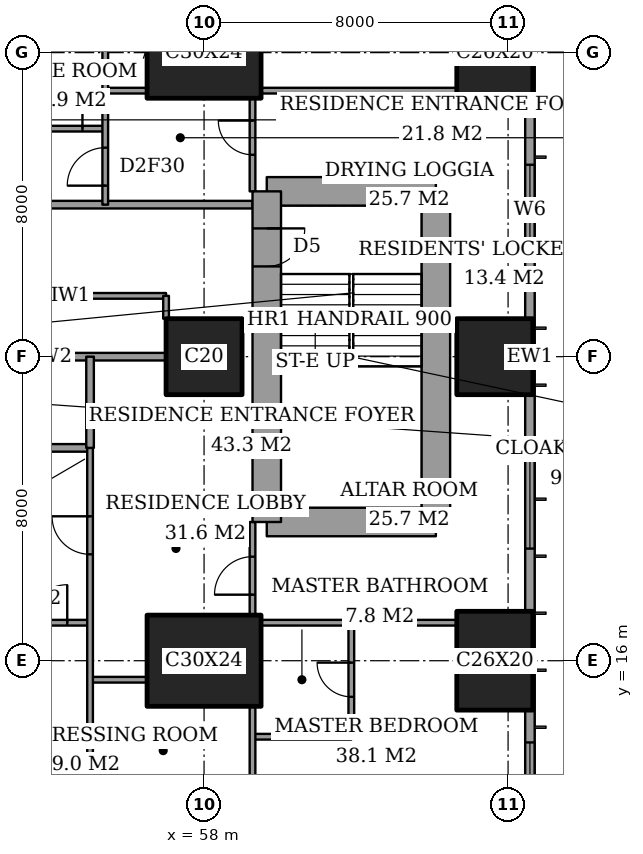
"""IFC4 building model, lengths in metres.
Left out: names, types, materials, properties, quantities, classifications, styles, units other than length and angle.
Written with IfcOpenShell. Run it as: python <this file> out.ifc"""

import sys

from ifc_helpers import new_model, si_unit, direction, frame, frame_2d, origin, origin_2d, place, context, subcontext, project, spatial, rectangle, extrude, element, fill, save


model = new_model("IFC4")
c1 = context("Model", 3, precision=1e-05, world=origin(), true_north=direction((0.0, 1.0)))
c2 = subcontext(c1, "Body", "Model", "MODEL_VIEW")
j1 = project(units=[si_unit("LENGTHUNIT", "METRE"), si_unit("PLANEANGLEUNIT", "RADIAN")], contexts=[c1])
p1 = place(None, origin())
s1 = spatial("IfcSite", under=j1, at=p1, CompositionType="ELEMENT")
p2 = place(p1, origin())
s2 = spatial("IfcBuilding", under=s1, at=p2, CompositionType="ELEMENT")
p3 = place(p2, frame((0.0, 0.0, 65.6)))
s3 = spatial("IfcBuildingStorey", under=s2, at=p3, CompositionType="ELEMENT", Elevation=65.6)
p4 = place(p3, frame((58.0, 16.0, 0.0), z_axis=(0.0, 0.0, 1.0), x_axis=(1.0, 0.0, 0.0)))
e1 = element("IfcColumn", 1, at=p4, inside=s3, PredefinedType="COLUMN", context=c2, shape_type="SweptSolid", body=[
    extrude(rectangle(XDim=3.0, YDim=2.4, at=origin_2d()), origin(), (0.0, 0.0, 1.0), 3.6),
])
p5 = place(p3, frame((58.0, 24.0, 0.0), z_axis=(0.0, 0.0, 1.0), x_axis=(1.0, 0.0, 0.0)))
e2 = element("IfcColumn", 2, at=p5, inside=s3, PredefinedType="COLUMN", context=c2, shape_type="SweptSolid", body=[
    extrude(rectangle(XDim=2.0, YDim=2.0, at=origin_2d()), origin(), (0.0, 0.0, 1.0), 3.6),
])
p6 = place(p3, frame((58.0, 32.0, 0.0), z_axis=(0.0, 0.0, 1.0), x_axis=(1.0, 0.0, 0.0)))
e3 = element("IfcColumn", 3, at=p6, inside=s3, PredefinedType="COLUMN", context=c2, shape_type="SweptSolid", body=[
    extrude(rectangle(XDim=3.0, YDim=2.4, at=origin_2d()), origin(), (0.0, 0.0, 1.0), 3.6),
])
p7 = place(p3, frame((65.65, 16.0, 0.0), z_axis=(0.0, 0.0, 1.0), x_axis=(0.0, 1.0, 0.0)))
e4 = element("IfcColumn", 4, at=p7, inside=s3, PredefinedType="COLUMN", context=c2, shape_type="SweptSolid", body=[
    extrude(rectangle(XDim=2.6, YDim=2.0, at=origin_2d()), origin(), (0.0, 0.0, 1.0), 3.6),
])
p8 = place(p3, frame((65.65, 24.0, 0.0), z_axis=(0.0, 0.0, 1.0), x_axis=(1.0, 0.0, 0.0)))
e5 = element("IfcColumn", 5, at=p8, inside=s3, PredefinedType="COLUMN", context=c2, shape_type="SweptSolid", body=[
    extrude(rectangle(XDim=2.0, YDim=2.0, at=origin_2d()), origin(), (0.0, 0.0, 1.0), 3.6),
])
p9 = place(p3, frame((65.65, 32.0, 0.0), z_axis=(0.0, 0.0, 1.0), x_axis=(0.0, 1.0, 0.0)))
e6 = element("IfcColumn", 6, at=p9, inside=s3, PredefinedType="COLUMN", context=c2, shape_type="SweptSolid", body=[
    extrude(rectangle(XDim=2.6, YDim=2.0, at=origin_2d()), origin(), (0.0, 0.0, 1.0), 3.6),
])
p10 = place(p3, frame((59.65, 19.65, 0.0), z_axis=(0.0, 0.0, 1.0), x_axis=(1.0, 0.0, 0.0)))
e7 = element("IfcWall", 7, at=p10, inside=s3, PredefinedType="SHEAR", context=c2, shape_type="SweptSolid", body=[
    extrude(rectangle(XDim=4.45, YDim=0.75, at=frame_2d((2.225, 0.0))), origin(), (0.0, 0.0, 1.0), 3.6),
])
p11 = place(p3, frame((64.1, 19.65, 0.0), z_axis=(0.0, 0.0, 1.0), x_axis=(0.0, 1.0, 0.0)))
e8 = element("IfcWall", 8, at=p11, inside=s3, PredefinedType="SHEAR", context=c2, shape_type="SweptSolid", body=[
    extrude(rectangle(XDim=8.7, YDim=0.75, at=frame_2d((4.35, 0.0))), origin(), (0.0, 0.0, 1.0), 3.6),
])
p12 = place(p3, frame((64.1, 28.35, 0.0), z_axis=(0.0, 0.0, 1.0), x_axis=(-1.0, 0.0, 0.0)))
e9 = element("IfcWall", 9, at=p12, inside=s3, PredefinedType="SHEAR", context=c2, shape_type="SweptSolid", body=[
    extrude(rectangle(XDim=4.45, YDim=0.75, at=frame_2d((2.225, 0.0))), origin(), (0.0, 0.0, 1.0), 3.6),
])
p13 = place(p3, frame((59.65, 28.35, 0.0), z_axis=(0.0, 0.0, 1.0), x_axis=(0.0, -1.0, 0.0)))
e10 = element("IfcWall", 10, at=p13, inside=s3, PredefinedType="SHEAR", context=c2, shape_type="SweptSolid", body=[
    extrude(rectangle(XDim=8.7, YDim=0.75, at=frame_2d((4.35, 0.0))), origin(), (0.0, 0.0, 1.0), 3.6),
])
p14 = place(p13, frame((0.975, 0.0, 0.0)))
e11 = element("IfcOpeningElement", 11, at=p14, cuts=e10, PredefinedType="OPENING", context=c2, shape_type="SweptSolid", body=[
    extrude(rectangle(XDim=1.0, YDim=2.1, at=frame_2d((0.5, 1.05))), frame((0.0, 0.385, 0.0), z_axis=(0.0, -1.0, 0.0), x_axis=(1.0, 0.0, 0.0)), (0.0, 0.0, 1.0), 0.77),
])
p15 = place(p3, frame((66.575, 3.175, 0.0), z_axis=(0.0, 0.0, 1.0), x_axis=(0.0, 1.0, 0.0)))
e12 = element("IfcWall", 12, at=p15, inside=s3, PredefinedType="SOLIDWALL", context=c2, shape_type="SweptSolid", body=[
    extrude(rectangle(XDim=41.65, YDim=0.25, at=frame_2d((20.825, 0.0))), origin(), (0.0, 0.0, 1.0), 3.6),
])
p16 = place(p15, frame((0.775, 0.0, 0.6)))
e13 = element("IfcOpeningElement", 13, at=p16, cuts=e12, PredefinedType="OPENING", context=c2, shape_type="SweptSolid", body=[
    extrude(rectangle(XDim=2.4, YDim=2.0, at=frame_2d((1.2, 1.0))), frame((0.0, 0.135, 0.0), z_axis=(0.0, -1.0, 0.0), x_axis=(1.0, 0.0, 0.0)), (0.0, 0.0, 1.0), 0.27),
])
p17 = place(p15, frame((6.1, 0.0, 0.6)))
e14 = element("IfcOpeningElement", 14, at=p17, cuts=e12, PredefinedType="OPENING", context=c2, shape_type="SweptSolid", body=[
    extrude(rectangle(XDim=1.2, YDim=2.0, at=frame_2d((0.6, 1.0))), frame((0.0, 0.135, 0.0), z_axis=(0.0, -1.0, 0.0), x_axis=(1.0, 0.0, 0.0)), (0.0, 0.0, 1.0), 0.27),
])
p18 = place(p15, frame((8.275, 0.0, 0.6)))
e15 = element("IfcOpeningElement", 15, at=p18, cuts=e12, PredefinedType="OPENING", context=c2, shape_type="SweptSolid", body=[
    extrude(rectangle(XDim=2.4, YDim=2.0, at=frame_2d((1.2, 1.0))), frame((0.0, 0.135, 0.0), z_axis=(0.0, -1.0, 0.0), x_axis=(1.0, 0.0, 0.0)), (0.0, 0.0, 1.0), 0.27),
])
p19 = place(p15, frame((15.775, 0.0, 0.6)))
e16 = element("IfcOpeningElement", 16, at=p19, cuts=e12, PredefinedType="OPENING", context=c2, shape_type="SweptSolid", body=[
    extrude(rectangle(XDim=2.4, YDim=2.0, at=frame_2d((1.2, 1.0))), frame((0.0, 0.135, 0.0), z_axis=(0.0, -1.0, 0.0), x_axis=(1.0, 0.0, 0.0)), (0.0, 0.0, 1.0), 0.27),
])
p20 = place(p15, frame((23.475, 0.0, 0.6)))
e17 = element("IfcOpeningElement", 17, at=p20, cuts=e12, PredefinedType="OPENING", context=c2, shape_type="SweptSolid", body=[
    extrude(rectangle(XDim=2.4, YDim=2.0, at=frame_2d((1.2, 1.0))), frame((0.0, 0.135, 0.0), z_axis=(0.0, -1.0, 0.0), x_axis=(1.0, 0.0, 0.0)), (0.0, 0.0, 1.0), 0.27),
])
p21 = place(p15, frame((30.875, 0.0, 0.6)))
e18 = element("IfcOpeningElement", 18, at=p21, cuts=e12, PredefinedType="OPENING", context=c2, shape_type="SweptSolid", body=[
    extrude(rectangle(XDim=2.4, YDim=2.0, at=frame_2d((1.2, 1.0))), frame((0.0, 0.135, 0.0), z_axis=(0.0, -1.0, 0.0), x_axis=(1.0, 0.0, 0.0)), (0.0, 0.0, 1.0), 0.27),
])
p22 = place(p15, frame((34.325, 0.0, 0.6)))
e19 = element("IfcOpeningElement", 19, at=p22, cuts=e12, PredefinedType="OPENING", context=c2, shape_type="SweptSolid", body=[
    extrude(rectangle(XDim=1.2, YDim=2.0, at=frame_2d((0.6, 1.0))), frame((0.0, 0.135, 0.0), z_axis=(0.0, -1.0, 0.0), x_axis=(1.0, 0.0, 0.0)), (0.0, 0.0, 1.0), 0.27),
])
p23 = place(p15, frame((38.475, 0.0, 0.6)))
e20 = element("IfcOpeningElement", 20, at=p23, cuts=e12, PredefinedType="OPENING", context=c2, shape_type="SweptSolid", body=[
    extrude(rectangle(XDim=2.4, YDim=2.0, at=frame_2d((1.2, 1.0))), frame((0.0, 0.135, 0.0), z_axis=(0.0, -1.0, 0.0), x_axis=(1.0, 0.0, 0.0)), (0.0, 0.0, 1.0), 0.27),
])
p24 = place(p3, frame((59.275, 14.0, 0.0), z_axis=(0.0, 0.0, 1.0), x_axis=(1.0, 0.0, 0.0)))
e21 = element("IfcWall", 21, at=p24, inside=s3, PredefinedType="PARTITIONING", context=c2, shape_type="SweptSolid", body=[
    extrude(rectangle(XDim=2.6, YDim=0.15, at=frame_2d((1.3, 0.0))), origin(), (0.0, 0.0, 1.0), 3.35),
])
p25 = place(p3, frame((55.0, 15.5, 0.0), z_axis=(0.0, 0.0, 1.0), x_axis=(1.0, 0.0, 0.0)))
e22 = element("IfcWall", 22, at=p25, inside=s3, PredefinedType="PARTITIONING", context=c2, shape_type="SweptSolid", body=[
    extrude(rectangle(XDim=1.5, YDim=0.15, at=frame_2d((0.75, 0.0))), origin(), (0.0, 0.0, 1.0), 3.35),
])
p26 = place(p3, frame((51.6, 17.0, 0.0), z_axis=(0.0, 0.0, 1.0), x_axis=(1.0, 0.0, 0.0)))
e23 = element("IfcWall", 23, at=p26, inside=s3, PredefinedType="PARTITIONING", context=c2, shape_type="SweptSolid", body=[
    extrude(rectangle(XDim=3.4, YDim=0.15, at=frame_2d((1.7, 0.0))), origin(), (0.0, 0.0, 1.0), 3.35),
])
p27 = place(p26, frame((1.8, 0.0, 0.0)))
e24 = element("IfcOpeningElement", 24, at=p27, cuts=e23, PredefinedType="OPENING", context=c2, shape_type="SweptSolid", body=[
    extrude(rectangle(XDim=1.0, YDim=2.1, at=frame_2d((0.5, 1.05))), frame((0.0, 0.085, 0.0), z_axis=(0.0, -1.0, 0.0), x_axis=(1.0, 0.0, 0.0)), (0.0, 0.0, 1.0), 0.17),
])
p28 = place(p3, frame((59.5, 17.0, 0.0), z_axis=(0.0, 0.0, 1.0), x_axis=(1.0, 0.0, 0.0)))
e25 = element("IfcWall", 25, at=p28, inside=s3, PredefinedType="PARTITIONING", context=c2, shape_type="SweptSolid", body=[
    extrude(rectangle(XDim=5.15, YDim=0.15, at=frame_2d((2.575, 0.0))), origin(), (0.0, 0.0, 1.0), 3.35),
])
p29 = place(p3, frame((51.2, 21.6, 0.0), z_axis=(0.0, 0.0, 1.0), x_axis=(1.0, 0.0, 0.0)))
e26 = element("IfcWall", 26, at=p29, inside=s3, PredefinedType="PARTITIONING", context=c2, shape_type="SweptSolid", body=[
    extrude(rectangle(XDim=3.8, YDim=0.2, at=frame_2d((1.9, 0.0))), origin(), (0.0, 0.0, 1.0), 3.35),
])
p30 = place(p29, frame((1.45, 0.0, 0.0)))
e27 = element("IfcOpeningElement", 27, at=p30, cuts=e26, PredefinedType="OPENING", context=c2, shape_type="SweptSolid", body=[
    extrude(rectangle(XDim=0.9, YDim=2.1, at=frame_2d((0.45, 1.05))), frame((0.0, 0.11, 0.0), z_axis=(0.0, -1.0, 0.0), x_axis=(1.0, 0.0, 0.0)), (0.0, 0.0, 1.0), 0.22),
])
p31 = place(p3, frame((51.0, 24.0, 0.0), z_axis=(0.0, 0.0, 1.0), x_axis=(1.0, 0.0, 0.0)))
e28 = element("IfcWall", 28, at=p31, inside=s3, PredefinedType="PARTITIONING", context=c2, shape_type="SweptSolid", body=[
    extrude(rectangle(XDim=6.0, YDim=0.2, at=frame_2d((3.0, 0.0))), origin(), (0.0, 0.0, 1.0), 3.35),
])
p32 = place(p3, frame((48.6, 25.6, 0.0), z_axis=(0.0, 0.0, 1.0), x_axis=(1.0, 0.0, 0.0)))
e29 = element("IfcWall", 29, at=p32, inside=s3, PredefinedType="PARTITIONING", context=c2, shape_type="SweptSolid", body=[
    extrude(rectangle(XDim=8.4, YDim=0.15, at=frame_2d((4.2, 0.0))), origin(), (0.0, 0.0, 1.0), 3.35),
])
p33 = place(p32, frame((3.75, 0.0, 0.0)))
e30 = element("IfcOpeningElement", 30, at=p33, cuts=e29, PredefinedType="OPENING", context=c2, shape_type="SweptSolid", body=[
    extrude(rectangle(XDim=0.9, YDim=2.1, at=frame_2d((0.45, 1.05))), frame((0.0, 0.085, 0.0), z_axis=(0.0, -1.0, 0.0), x_axis=(1.0, 0.0, 0.0)), (0.0, 0.0, 1.0), 0.17),
])
p34 = place(p3, frame((42.0, 28.0, 0.0), z_axis=(0.0, 0.0, 1.0), x_axis=(1.0, 0.0, 0.0)))
e31 = element("IfcWall", 31, at=p34, inside=s3, PredefinedType="PARTITIONING", context=c2, shape_type="SweptSolid", body=[
    extrude(rectangle(XDim=17.275, YDim=0.2, at=frame_2d((8.637, 0.0))), origin(), (0.0, 0.0, 1.0), 3.35),
])
p35 = place(p34, frame((9.1, 0.0, 0.0)))
e32 = element("IfcOpeningElement", 32, at=p35, cuts=e31, PredefinedType="OPENING", context=c2, shape_type="SweptSolid", body=[
    extrude(rectangle(XDim=1.2, YDim=2.4, at=frame_2d((0.6, 1.2))), frame((0.0, 0.11, 0.0), z_axis=(0.0, -1.0, 0.0), x_axis=(1.0, 0.0, 0.0)), (0.0, 0.0, 1.0), 0.22),
])
p36 = place(p3, frame((51.6, 30.0, 0.0), z_axis=(0.0, 0.0, 1.0), x_axis=(1.0, 0.0, 0.0)))
e33 = element("IfcWall", 33, at=p36, inside=s3, PredefinedType="PARTITIONING", context=c2, shape_type="SweptSolid", body=[
    extrude(rectangle(XDim=3.8, YDim=0.15, at=frame_2d((1.9, 0.0))), origin(), (0.0, 0.0, 1.0), 3.35),
])
p37 = place(p36, frame((2.2, 0.0, 0.0)))
e34 = element("IfcOpeningElement", 34, at=p37, cuts=e33, PredefinedType="OPENING", context=c2, shape_type="SweptSolid", body=[
    extrude(rectangle(XDim=1.0, YDim=2.1, at=frame_2d((0.5, 1.05))), frame((0.0, 0.085, 0.0), z_axis=(0.0, -1.0, 0.0), x_axis=(1.0, 0.0, 0.0)), (0.0, 0.0, 1.0), 0.17),
])
p38 = place(p3, frame((55.4, 31.0, 0.0), z_axis=(0.0, 0.0, 1.0), x_axis=(1.0, 0.0, 0.0)))
e35 = element("IfcWall", 35, at=p38, inside=s3, PredefinedType="PARTITIONING", context=c2, shape_type="SweptSolid", body=[
    extrude(rectangle(XDim=1.1, YDim=0.15, at=frame_2d((0.55, 0.0))), origin(), (0.0, 0.0, 1.0), 3.35),
])
p39 = place(p3, frame((59.5, 31.0, 0.0), z_axis=(0.0, 0.0, 1.0), x_axis=(1.0, 0.0, 0.0)))
e36 = element("IfcWall", 36, at=p39, inside=s3, PredefinedType="PARTITIONING", context=c2, shape_type="SweptSolid", body=[
    extrude(rectangle(XDim=5.15, YDim=0.15, at=frame_2d((2.575, 0.0))), origin(), (0.0, 0.0, 1.0), 3.35),
])
p40 = place(p3, frame((55.0, 21.6, 0.0), z_axis=(0.0, 0.0, 1.0), x_axis=(0.0, 1.0, 0.0)))
e37 = element("IfcWall", 37, at=p40, inside=s3, PredefinedType="PARTITIONING", context=c2, shape_type="SweptSolid", body=[
    extrude(rectangle(XDim=2.4, YDim=0.2, at=frame_2d((1.2, 0.0))), origin(), (0.0, 0.0, 1.0), 3.35),
])
p41 = place(p3, frame((55.0, 10.6, 0.0), z_axis=(0.0, 0.0, 1.0), x_axis=(0.0, 1.0, 0.0)))
e38 = element("IfcWall", 38, at=p41, inside=s3, PredefinedType="PARTITIONING", context=c2, shape_type="SweptSolid", body=[
    extrude(rectangle(XDim=11.0, YDim=0.15, at=frame_2d((5.5, 0.0))), origin(), (0.0, 0.0, 1.0), 3.35),
])
p42 = place(p41, frame((8.2, 0.0, 0.0)))
e39 = element("IfcOpeningElement", 39, at=p42, cuts=e38, PredefinedType="OPENING", context=c2, shape_type="SweptSolid", body=[
    extrude(rectangle(XDim=1.0, YDim=2.1, at=frame_2d((0.5, 1.05))), frame((0.0, 0.085, 0.0), z_axis=(0.0, -1.0, 0.0), x_axis=(1.0, 0.0, 0.0)), (0.0, 0.0, 1.0), 0.17),
])
p43 = place(p3, frame((55.4, 28.0, 0.0), z_axis=(0.0, 0.0, 1.0), x_axis=(0.0, 1.0, 0.0)))
e40 = element("IfcWall", 40, at=p43, inside=s3, PredefinedType="PARTITIONING", context=c2, shape_type="SweptSolid", body=[
    extrude(rectangle(XDim=9.2, YDim=0.15, at=frame_2d((4.6, 0.0))), origin(), (0.0, 0.0, 1.0), 3.35),
])
p44 = place(p43, frame((0.5, 0.0, 0.0)))
e41 = element("IfcOpeningElement", 41, at=p44, cuts=e40, PredefinedType="OPENING", context=c2, shape_type="SweptSolid", body=[
    extrude(rectangle(XDim=1.0, YDim=2.1, at=frame_2d((0.5, 1.05))), frame((0.0, 0.085, 0.0), z_axis=(0.0, -1.0, 0.0), x_axis=(1.0, 0.0, 0.0)), (0.0, 0.0, 1.0), 0.17),
])
p45 = place(p3, frame((57.0, 25.0, 0.0), z_axis=(0.0, 0.0, 1.0), x_axis=(0.0, 1.0, 0.0)))
e42 = element("IfcWall", 42, at=p45, inside=s3, PredefinedType="PARTITIONING", context=c2, shape_type="SweptSolid", body=[
    extrude(rectangle(XDim=0.6, YDim=0.15, at=frame_2d((0.3, 0.0))), origin(), (0.0, 0.0, 1.0), 3.35),
])
p46 = place(p3, frame((59.275, 10.6, 0.0), z_axis=(0.0, 0.0, 1.0), x_axis=(0.0, 1.0, 0.0)))
e43 = element("IfcWall", 43, at=p46, inside=s3, PredefinedType="PARTITIONING", context=c2, shape_type="SweptSolid", body=[
    extrude(rectangle(XDim=4.2, YDim=0.15, at=frame_2d((2.1, 0.0))), origin(), (0.0, 0.0, 1.0), 3.35),
])
p47 = place(p46, frame((1.25, 0.0, 0.0)))
e44 = element("IfcOpeningElement", 44, at=p47, cuts=e43, PredefinedType="OPENING", context=c2, shape_type="SweptSolid", body=[
    extrude(rectangle(XDim=0.9, YDim=2.1, at=frame_2d((0.45, 1.05))), frame((0.0, 0.085, 0.0), z_axis=(0.0, -1.0, 0.0), x_axis=(1.0, 0.0, 0.0)), (0.0, 0.0, 1.0), 0.17),
])
p48 = place(p3, frame((59.275, 17.2, 0.0), z_axis=(0.0, 0.0, 1.0), x_axis=(0.0, 1.0, 0.0)))
e45 = element("IfcWall", 45, at=p48, inside=s3, PredefinedType="PARTITIONING", context=c2, shape_type="SweptSolid", body=[
    extrude(rectangle(XDim=2.45, YDim=0.15, at=frame_2d((1.225, 0.0))), origin(), (0.0, 0.0, 1.0), 3.35),
])
p49 = place(p48, frame((0.538, 0.0, 0.0)))
e46 = element("IfcOpeningElement", 46, at=p49, cuts=e45, PredefinedType="OPENING", context=c2, shape_type="SweptSolid", body=[
    extrude(rectangle(XDim=1.0, YDim=2.1, at=frame_2d((0.5, 1.05))), frame((0.0, 0.085, 0.0), z_axis=(0.0, -1.0, 0.0), x_axis=(1.0, 0.0, 0.0)), (0.0, 0.0, 1.0), 0.17),
])
p50 = place(p3, frame((59.275, 28.35, 0.0), z_axis=(0.0, 0.0, 1.0), x_axis=(0.0, 1.0, 0.0)))
e47 = element("IfcWall", 47, at=p50, inside=s3, PredefinedType="PARTITIONING", context=c2, shape_type="SweptSolid", body=[
    extrude(rectangle(XDim=2.45, YDim=0.15, at=frame_2d((1.225, 0.0))), origin(), (0.0, 0.0, 1.0), 3.35),
])
p51 = place(p50, frame((0.962, 0.0, 0.0)))
e48 = element("IfcOpeningElement", 48, at=p51, cuts=e47, PredefinedType="OPENING", context=c2, shape_type="SweptSolid", body=[
    extrude(rectangle(XDim=0.9, YDim=2.1, at=frame_2d((0.45, 1.05))), frame((0.0, 0.085, 0.0), z_axis=(0.0, -1.0, 0.0), x_axis=(1.0, 0.0, 0.0)), (0.0, 0.0, 1.0), 0.17),
])
p52 = place(p3, frame((61.875, 14.0, 0.0), z_axis=(0.0, 0.0, 1.0), x_axis=(0.0, 1.0, 0.0)))
e49 = element("IfcWall", 49, at=p52, inside=s3, PredefinedType="PARTITIONING", context=c2, shape_type="SweptSolid", body=[
    extrude(rectangle(XDim=3.0, YDim=0.15, at=frame_2d((1.5, 0.0))), origin(), (0.0, 0.0, 1.0), 3.35),
])
p53 = place(p52, frame((1.05, 0.0, 0.0)))
e50 = element("IfcOpeningElement", 50, at=p53, cuts=e49, PredefinedType="OPENING", context=c2, shape_type="SweptSolid", body=[
    extrude(rectangle(XDim=0.9, YDim=2.1, at=frame_2d((0.45, 1.05))), frame((0.0, 0.085, 0.0), z_axis=(0.0, -1.0, 0.0), x_axis=(1.0, 0.0, 0.0)), (0.0, 0.0, 1.0), 0.17),
])
p54 = place(p18, origin())
e51 = element("IfcWindow", 51, at=p54, inside=s3, PartitioningType="SINGLE_PANEL", PredefinedType="WINDOW", context=c2, shape_type="SweptSolid", body=[
    extrude(rectangle(XDim=2.4, YDim=2.0, at=frame_2d((1.2, 1.0))), frame((0.0, 0.03, 0.0), z_axis=(0.0, -1.0, 0.0), x_axis=(1.0, 0.0, 0.0)), (0.0, 0.0, 1.0), 0.06),
])
fill(e15, e51)
p55 = place(p19, origin())
e52 = element("IfcWindow", 52, at=p55, inside=s3, PartitioningType="SINGLE_PANEL", PredefinedType="WINDOW", context=c2, shape_type="SweptSolid", body=[
    extrude(rectangle(XDim=2.4, YDim=2.0, at=frame_2d((1.2, 1.0))), frame((0.0, 0.03, 0.0), z_axis=(0.0, -1.0, 0.0), x_axis=(1.0, 0.0, 0.0)), (0.0, 0.0, 1.0), 0.06),
])
fill(e16, e52)
p56 = place(p20, origin())
e53 = element("IfcWindow", 53, at=p56, inside=s3, PartitioningType="SINGLE_PANEL", PredefinedType="WINDOW", context=c2, shape_type="SweptSolid", body=[
    extrude(rectangle(XDim=2.4, YDim=2.0, at=frame_2d((1.2, 1.0))), frame((0.0, 0.03, 0.0), z_axis=(0.0, -1.0, 0.0), x_axis=(1.0, 0.0, 0.0)), (0.0, 0.0, 1.0), 0.06),
])
fill(e17, e53)
p57 = place(p53, origin())
e54 = element("IfcDoor", 54, at=p57, inside=s3, OperationType="SINGLE_SWING_LEFT", PredefinedType="DOOR", context=c2, shape_type="SweptSolid", body=[
    extrude(rectangle(XDim=0.9, YDim=2.1, at=frame_2d((0.45, 1.05))), frame((0.0, 0.025, 0.0), z_axis=(0.0, -1.0, 0.0), x_axis=(1.0, 0.0, 0.0)), (0.0, 0.0, 1.0), 0.05),
])
fill(e50, e54)
p58 = place(p49, origin())
e55 = element("IfcDoor", 55, at=p58, inside=s3, OperationType="SINGLE_SWING_RIGHT", PredefinedType="DOOR", context=c2, shape_type="SweptSolid", body=[
    extrude(rectangle(XDim=1.0, YDim=2.1, at=frame_2d((0.5, 1.05))), frame((0.0, 0.025, 0.0), z_axis=(0.0, -1.0, 0.0), x_axis=(1.0, 0.0, 0.0)), (0.0, 0.0, 1.0), 0.05),
])
fill(e46, e55)
p59 = place(p42, origin())
e56 = element("IfcDoor", 56, at=p59, inside=s3, OperationType="SINGLE_SWING_LEFT", PredefinedType="DOOR", context=c2, shape_type="SweptSolid", body=[
    extrude(rectangle(XDim=1.0, YDim=2.1, at=frame_2d((0.5, 1.05))), frame((0.0, 0.025, 0.0), z_axis=(0.0, -1.0, 0.0), x_axis=(1.0, 0.0, 0.0)), (0.0, 0.0, 1.0), 0.05),
])
fill(e39, e56)
p60 = place(p27, origin())
e57 = element("IfcDoor", 57, at=p60, inside=s3, OperationType="SINGLE_SWING_LEFT", PredefinedType="DOOR", context=c2, shape_type="SweptSolid", body=[
    extrude(rectangle(XDim=1.0, YDim=2.1, at=frame_2d((0.5, 1.05))), frame((0.0, 0.025, 0.0), z_axis=(0.0, -1.0, 0.0), x_axis=(1.0, 0.0, 0.0)), (0.0, 0.0, 1.0), 0.05),
])
fill(e24, e57)
p61 = place(p51, origin())
e58 = element("IfcDoor", 58, at=p61, inside=s3, OperationType="SINGLE_SWING_LEFT", PredefinedType="DOOR", context=c2, shape_type="SweptSolid", body=[
    extrude(rectangle(XDim=0.9, YDim=2.1, at=frame_2d((0.45, 1.05))), frame((0.0, 0.025, 0.0), z_axis=(0.0, -1.0, 0.0), x_axis=(1.0, 0.0, 0.0)), (0.0, 0.0, 1.0), 0.05),
])
fill(e48, e58)
p62 = place(p44, origin())
e59 = element("IfcDoor", 59, at=p62, inside=s3, OperationType="SINGLE_SWING_RIGHT", PredefinedType="DOOR", context=c2, shape_type="SweptSolid", body=[
    extrude(rectangle(XDim=1.0, YDim=2.1, at=frame_2d((0.5, 1.05))), frame((0.0, 0.025, 0.0), z_axis=(0.0, -1.0, 0.0), x_axis=(1.0, 0.0, 0.0)), (0.0, 0.0, 1.0), 0.05),
])
fill(e41, e59)
p63 = place(p37, origin())
e60 = element("IfcDoor", 60, at=p63, inside=s3, OperationType="SINGLE_SWING_LEFT", PredefinedType="DOOR", context=c2, shape_type="SweptSolid", body=[
    extrude(rectangle(XDim=1.0, YDim=2.1, at=frame_2d((0.5, 1.05))), frame((0.0, 0.025, 0.0), z_axis=(0.0, -1.0, 0.0), x_axis=(1.0, 0.0, 0.0)), (0.0, 0.0, 1.0), 0.05),
])
fill(e34, e60)
p64 = place(p14, origin())
e61 = element("IfcDoor", 61, at=p64, inside=s3, OperationType="SINGLE_SWING_RIGHT", PredefinedType="DOOR", context=c2, shape_type="SweptSolid", body=[
    extrude(rectangle(XDim=1.0, YDim=2.1, at=frame_2d((0.5, 1.05))), frame((0.0, 0.025, 0.0), z_axis=(0.0, -1.0, 0.0), x_axis=(1.0, 0.0, 0.0)), (0.0, 0.0, 1.0), 0.05),
])
fill(e11, e61)
save(model, sys.argv[1])
